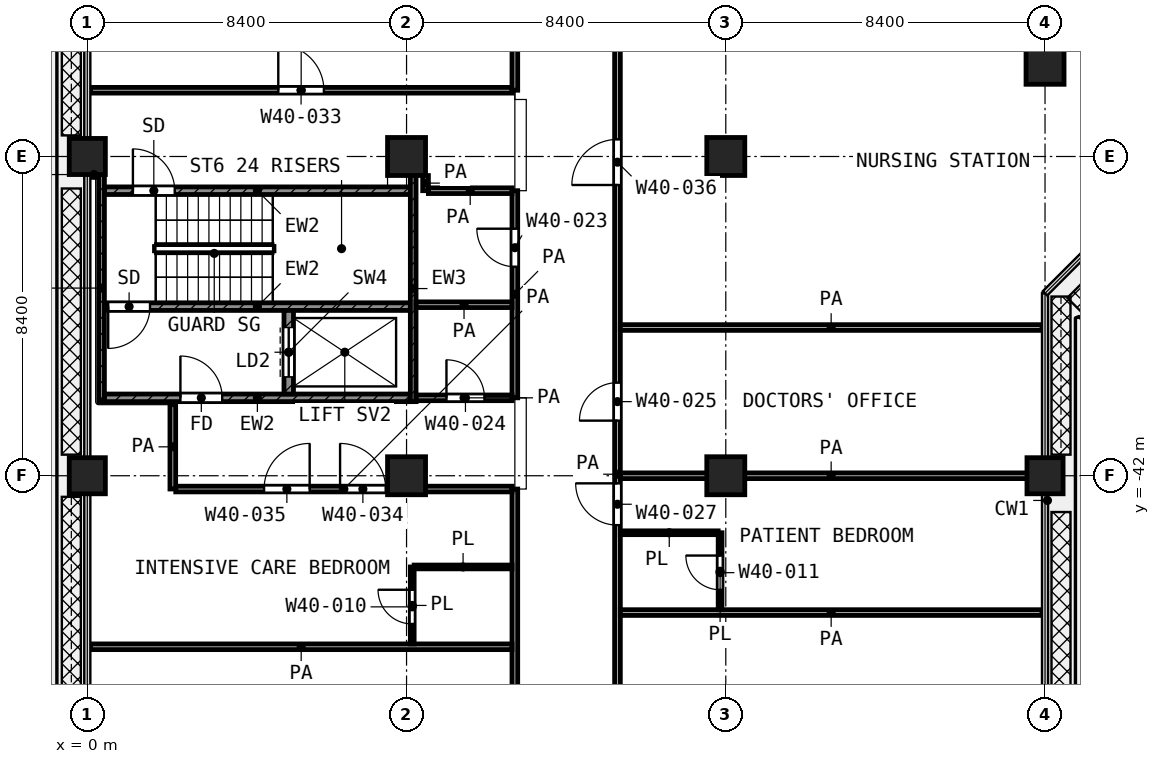
"""IFC4 building model, lengths in metres.
Left out: names, types, materials, properties, quantities, classifications, styles, units other than length and angle.
Written with IfcOpenShell. Run it as: python <this file> out.ifc"""

import sys

from ifc_helpers import new_model, si_unit, direction, frame, frame_2d, origin, origin_2d, place, context, subcontext, project, spatial, rectangle, extrude, element, fill, save


model = new_model("IFC4")
c1 = context("Model", 3, precision=1e-05, world=origin(), true_north=direction((0.0, 1.0)))
c2 = subcontext(c1, "Body", "Model", "MODEL_VIEW")
j1 = project(units=[si_unit("LENGTHUNIT", "METRE"), si_unit("PLANEANGLEUNIT", "RADIAN")], contexts=[c1])
p1 = place(None, origin())
s1 = spatial("IfcSite", under=j1, at=p1, CompositionType="ELEMENT")
p2 = place(p1, origin())
s2 = spatial("IfcBuilding", under=s1, at=p2, CompositionType="ELEMENT")
p3 = place(p2, frame((0.0, 0.0, 196.2)))
s3 = spatial("IfcBuildingStorey", under=s2, at=p3, CompositionType="ELEMENT", Elevation=196.2)
p4 = place(p3, frame((25.2, -31.2, 0.0), z_axis=(0.0, 0.0, 1.0), x_axis=(1.0, 0.0, 0.0)))
e1 = element("IfcColumn", 1, at=p4, inside=s3, PredefinedType="COLUMN", context=c2, shape_type="SweptSolid", body=[
    extrude(rectangle(XDim=1.0, YDim=1.0, at=origin_2d()), origin(), (0.0, 0.0, 1.0), 4.2),
])
p5 = place(p3, frame((0.0, -33.6, 0.0), z_axis=(0.0, 0.0, 1.0), x_axis=(1.0, 0.0, 0.0)))
e2 = element("IfcColumn", 2, at=p5, inside=s3, PredefinedType="COLUMN", context=c2, shape_type="SweptSolid", body=[
    extrude(rectangle(XDim=0.95, YDim=0.95, at=origin_2d()), origin(), (0.0, 0.0, 1.0), 4.2),
])
for number, where, z_axis, x_axis in (
    (3, (8.4, -33.6, 0.0), (0.0, 0.0, 1.0), (1.0, 0.0, 0.0)),
    (4, (16.8, -33.6, 0.0), (0.0, 0.0, 1.0), (1.0, 0.0, 0.0)),
):
    element("IfcColumn", number, at=place(p3, frame(where, z_axis=z_axis, x_axis=x_axis)), inside=s3, PredefinedType="COLUMN", context=c2, shape_type="SweptSolid", body=[
        extrude(rectangle(XDim=1.0, YDim=1.0, at=origin_2d()), origin(), (0.0, 0.0, 1.0), 4.2),
    ])
p6 = place(p3, frame((0.0, -42.0, 0.0), z_axis=(0.0, 0.0, 1.0), x_axis=(1.0, 0.0, 0.0)))
e5 = element("IfcColumn", 5, at=p6, inside=s3, PredefinedType="COLUMN", context=c2, shape_type="SweptSolid", body=[
    extrude(rectangle(XDim=0.95, YDim=0.95, at=origin_2d()), origin(), (0.0, 0.0, 1.0), 4.2),
])
for number, where, z_axis, x_axis in (
    (6, (8.4, -42.0, 0.0), (0.0, 0.0, 1.0), (1.0, 0.0, 0.0)),
    (7, (16.8, -42.0, 0.0), (0.0, 0.0, 1.0), (1.0, 0.0, 0.0)),
):
    element("IfcColumn", number, at=place(p3, frame(where, z_axis=z_axis, x_axis=x_axis)), inside=s3, PredefinedType="COLUMN", context=c2, shape_type="SweptSolid", body=[
        extrude(rectangle(XDim=1.0, YDim=1.0, at=origin_2d()), origin(), (0.0, 0.0, 1.0), 4.2),
    ])
p7 = place(p3, frame((25.2, -42.0, 0.0), z_axis=(0.0, 0.0, 1.0), x_axis=(1.0, 0.0, 0.0)))
e8 = element("IfcColumn", 8, at=p7, inside=s3, PredefinedType="COLUMN", context=c2, shape_type="SweptSolid", body=[
    extrude(rectangle(XDim=0.95, YDim=0.95, at=origin_2d()), origin(), (0.0, 0.0, 1.0), 4.2),
])
p8 = place(p3, frame((0.375, -40.05, 0.0), z_axis=(0.0, 0.0, 1.0), x_axis=(0.0, 1.0, 0.0)))
e9 = element("IfcWall", 9, at=p8, inside=s3, PredefinedType="SHEAR", context=c2, shape_type="SweptSolid", body=[
    extrude(rectangle(XDim=5.975, YDim=0.15, at=frame_2d((2.988, 0.0))), origin(), (0.0, 0.0, 1.0), 3.6),
])
p9 = place(p3, frame((8.575, -40.05, 0.0), z_axis=(0.0, 0.0, 1.0), x_axis=(0.0, 1.0, 0.0)))
e10 = element("IfcWall", 10, at=p9, inside=s3, PredefinedType="SHEAR", context=c2, shape_type="SweptSolid", body=[
    extrude(rectangle(XDim=5.95, YDim=0.15, at=frame_2d((2.975, 0.0))), origin(), (0.0, 0.0, 1.0), 3.6),
])
p10 = place(p3, frame((0.45, -34.5, 0.0), z_axis=(0.0, 0.0, 1.0), x_axis=(1.0, 0.0, 0.0)))
e11 = element("IfcWall", 11, at=p10, inside=s3, PredefinedType="SHEAR", context=c2, shape_type="SweptSolid", body=[
    extrude(rectangle(XDim=8.05, YDim=0.2, at=frame_2d((4.025, 0.0))), origin(), (0.0, 0.0, 1.0), 3.6),
])
p11 = place(p10, frame((0.75, 0.0, 0.0)))
e12 = element("IfcOpeningElement", 12, at=p11, cuts=e11, PredefinedType="OPENING", context=c2, shape_type="SweptSolid", body=[
    extrude(rectangle(XDim=1.1, YDim=2.1, at=frame_2d((0.55, 1.05))), frame((0.0, 0.11, 0.0), z_axis=(0.0, -1.0, 0.0), x_axis=(1.0, 0.0, 0.0)), (0.0, 0.0, 1.0), 0.22),
])
p12 = place(p3, frame((0.45, -37.55, 0.0), z_axis=(0.0, 0.0, 1.0), x_axis=(1.0, 0.0, 0.0)))
e13 = element("IfcWall", 13, at=p12, inside=s3, PredefinedType="SHEAR", context=c2, shape_type="SweptSolid", body=[
    extrude(rectangle(XDim=8.05, YDim=0.2, at=frame_2d((4.025, 0.0))), origin(), (0.0, 0.0, 1.0), 3.6),
])
p13 = place(p12, frame((0.1, 0.0, 0.0)))
e14 = element("IfcOpeningElement", 14, at=p13, cuts=e13, PredefinedType="OPENING", context=c2, shape_type="SweptSolid", body=[
    extrude(rectangle(XDim=1.1, YDim=2.1, at=frame_2d((0.55, 1.05))), frame((0.0, 0.11, 0.0), z_axis=(0.0, -1.0, 0.0), x_axis=(1.0, 0.0, 0.0)), (0.0, 0.0, 1.0), 0.22),
])
p14 = place(p3, frame((0.45, -39.95, 0.0), z_axis=(0.0, 0.0, 1.0), x_axis=(1.0, 0.0, 0.0)))
e15 = element("IfcWall", 15, at=p14, inside=s3, PredefinedType="SHEAR", context=c2, shape_type="SweptSolid", body=[
    extrude(rectangle(XDim=8.05, YDim=0.2, at=frame_2d((4.025, 0.0))), origin(), (0.0, 0.0, 1.0), 3.6),
])
p15 = place(p14, frame((2.0, 0.0, 0.0)))
e16 = element("IfcOpeningElement", 16, at=p15, cuts=e15, PredefinedType="OPENING", context=c2, shape_type="SweptSolid", body=[
    extrude(rectangle(XDim=1.1, YDim=2.1, at=frame_2d((0.55, 1.05))), frame((0.0, 0.11, 0.0), z_axis=(0.0, -1.0, 0.0), x_axis=(1.0, 0.0, 0.0)), (0.0, 0.0, 1.0), 0.22),
])
p16 = place(p3, frame((5.3, -39.85, 0.0), z_axis=(0.0, 0.0, 1.0), x_axis=(0.0, 1.0, 0.0)))
e17 = element("IfcWall", 17, at=p16, inside=s3, PredefinedType="SHEAR", context=c2, shape_type="SweptSolid", body=[
    extrude(rectangle(XDim=2.2, YDim=0.25, at=frame_2d((1.1, 0.0))), origin(), (0.0, 0.0, 1.0), 3.6),
])
p17 = place(p16, frame((0.45, 0.0, 0.0)))
e18 = element("IfcOpeningElement", 18, at=p17, cuts=e17, PredefinedType="OPENING", context=c2, shape_type="SweptSolid", body=[
    extrude(rectangle(XDim=1.3, YDim=2.1, at=frame_2d((0.65, 1.05))), frame((0.0, 0.135, 0.0), z_axis=(0.0, -1.0, 0.0), x_axis=(1.0, 0.0, 0.0)), (0.0, 0.0, 1.0), 0.27),
])
p18 = place(p3, frame((8.6, -44.4, 0.0), z_axis=(0.0, 0.0, 1.0), x_axis=(1.0, 0.0, 0.0)))
e19 = element("IfcWall", 19, at=p18, inside=s3, PredefinedType="PARTITIONING", context=c2, shape_type="SweptSolid", body=[
    extrude(rectangle(XDim=2.575, YDim=0.1, at=frame_2d((1.288, 0.0))), origin(), (0.0, 0.0, 1.0), 3.6),
])
p19 = place(p3, frame((14.025, -43.5, 0.0), z_axis=(0.0, 0.0, 1.0), x_axis=(1.0, 0.0, 0.0)))
e20 = element("IfcWall", 20, at=p19, inside=s3, PredefinedType="PARTITIONING", context=c2, shape_type="SweptSolid", body=[
    extrude(rectangle(XDim=2.575, YDim=0.1, at=frame_2d((1.288, 0.0))), origin(), (0.0, 0.0, 1.0), 3.6),
])
p20 = place(p3, frame((8.55, -46.425, 0.0), z_axis=(0.0, 0.0, 1.0), x_axis=(0.0, 1.0, 0.0)))
e21 = element("IfcWall", 21, at=p20, inside=s3, PredefinedType="PARTITIONING", context=c2, shape_type="SweptSolid", body=[
    extrude(rectangle(XDim=2.025, YDim=0.1, at=frame_2d((1.013, 0.0))), origin(), (0.0, 0.0, 1.0), 3.6),
])
p21 = place(p20, frame((0.525, 0.0, 0.0)))
e22 = element("IfcOpeningElement", 22, at=p21, cuts=e21, PredefinedType="OPENING", context=c2, shape_type="SweptSolid", body=[
    extrude(rectangle(XDim=0.9, YDim=2.1, at=frame_2d((0.45, 1.05))), frame((0.0, 0.06, 0.0), z_axis=(0.0, -1.0, 0.0), x_axis=(1.0, 0.0, 0.0)), (0.0, 0.0, 1.0), 0.12),
])
p22 = place(p3, frame((16.65, -45.525, 0.0), z_axis=(0.0, 0.0, 1.0), x_axis=(0.0, 1.0, 0.0)))
e23 = element("IfcWall", 23, at=p22, inside=s3, PredefinedType="PARTITIONING", context=c2, shape_type="SweptSolid", body=[
    extrude(rectangle(XDim=2.025, YDim=0.1, at=frame_2d((1.012, 0.0))), origin(), (0.0, 0.0, 1.0), 3.6),
])
p23 = place(p22, frame((0.525, 0.0, 0.0)))
e24 = element("IfcOpeningElement", 24, at=p23, cuts=e23, PredefinedType="OPENING", context=c2, shape_type="SweptSolid", body=[
    extrude(rectangle(XDim=0.9, YDim=2.1, at=frame_2d((0.45, 1.05))), frame((0.0, 0.06, 0.0), z_axis=(0.0, -1.0, 0.0), x_axis=(1.0, 0.0, 0.0)), (0.0, 0.0, 1.0), 0.12),
])
p24 = place(p3, frame((0.08, -46.5, 0.0), z_axis=(0.0, 0.0, 1.0), x_axis=(1.0, 0.0, 0.0)))
e25 = element("IfcWall", 25, at=p24, inside=s3, PredefinedType="PARTITIONING", context=c2, shape_type="SweptSolid", body=[
    extrude(rectangle(XDim=11.095, YDim=0.15, at=frame_2d((5.547, 0.0))), origin(), (0.0, 0.0, 1.0), 3.6),
])
p25 = place(p3, frame((14.025, -45.6, 0.0), z_axis=(0.0, 0.0, 1.0), x_axis=(1.0, 0.0, 0.0)))
e26 = element("IfcWall", 26, at=p25, inside=s3, PredefinedType="PARTITIONING", context=c2, shape_type="SweptSolid", body=[
    extrude(rectangle(XDim=11.095, YDim=0.15, at=frame_2d((5.548, 0.0))), origin(), (0.0, 0.0, 1.0), 3.6),
])
p26 = place(p3, frame((2.327, -42.35, 0.0), z_axis=(0.0, 0.0, 1.0), x_axis=(1.0, 0.0, 0.0)))
e27 = element("IfcWall", 27, at=p26, inside=s3, PredefinedType="PARTITIONING", context=c2, shape_type="SweptSolid", body=[
    extrude(rectangle(XDim=8.848, YDim=0.15, at=frame_2d((4.424, 0.0))), origin(), (0.0, 0.0, 1.0), 3.6),
])
p27 = place(p26, frame((4.324, 0.0, 0.0)))
e28 = element("IfcOpeningElement", 28, at=p27, cuts=e27, PredefinedType="OPENING", context=c2, shape_type="SweptSolid", body=[
    extrude(rectangle(XDim=1.2, YDim=2.1, at=frame_2d((0.6, 1.05))), frame((0.0, 0.085, 0.0), z_axis=(0.0, -1.0, 0.0), x_axis=(1.0, 0.0, 0.0)), (0.0, 0.0, 1.0), 0.17),
])
p28 = place(p26, frame((2.324, 0.0, 0.0)))
e29 = element("IfcOpeningElement", 29, at=p28, cuts=e27, PredefinedType="OPENING", context=c2, shape_type="SweptSolid", body=[
    extrude(rectangle(XDim=1.2, YDim=2.1, at=frame_2d((0.6, 1.05))), frame((0.0, 0.085, 0.0), z_axis=(0.0, -1.0, 0.0), x_axis=(1.0, 0.0, 0.0)), (0.0, 0.0, 1.0), 0.17),
])
p29 = place(p3, frame((14.025, -42.0, 0.0), z_axis=(0.0, 0.0, 1.0), x_axis=(1.0, 0.0, 0.0)))
e30 = element("IfcWall", 30, at=p29, inside=s3, PredefinedType="PARTITIONING", context=c2, shape_type="SweptSolid", body=[
    extrude(rectangle(XDim=11.095, YDim=0.15, at=frame_2d((5.548, 0.0))), origin(), (0.0, 0.0, 1.0), 3.6),
])
p30 = place(p3, frame((8.65, -39.95, 0.0), z_axis=(0.0, 0.0, 1.0), x_axis=(1.0, 0.0, 0.0)))
e31 = element("IfcWall", 31, at=p30, inside=s3, PredefinedType="PARTITIONING", context=c2, shape_type="SweptSolid", body=[
    extrude(rectangle(XDim=2.525, YDim=0.15, at=frame_2d((1.263, 0.0))), origin(), (0.0, 0.0, 1.0), 3.6),
])
p31 = place(p30, frame((0.8, 0.0, 0.0)))
e32 = element("IfcOpeningElement", 32, at=p31, cuts=e31, PredefinedType="OPENING", context=c2, shape_type="SweptSolid", body=[
    extrude(rectangle(XDim=1.0, YDim=2.1, at=frame_2d((0.5, 1.05))), frame((0.0, 0.085, 0.0), z_axis=(0.0, -1.0, 0.0), x_axis=(1.0, 0.0, 0.0)), (0.0, 0.0, 1.0), 0.17),
])
p32 = place(p3, frame((14.025, -38.1, 0.0), z_axis=(0.0, 0.0, 1.0), x_axis=(1.0, 0.0, 0.0)))
e33 = element("IfcWall", 33, at=p32, inside=s3, PredefinedType="PARTITIONING", context=c2, shape_type="SweptSolid", body=[
    extrude(rectangle(XDim=11.095, YDim=0.15, at=frame_2d((5.548, 0.0))), origin(), (0.0, 0.0, 1.0), 3.6),
])
p33 = place(p3, frame((8.65, -37.5, 0.0), z_axis=(0.0, 0.0, 1.0), x_axis=(1.0, 0.0, 0.0)))
e34 = element("IfcWall", 34, at=p33, inside=s3, PredefinedType="PARTITIONING", context=c2, shape_type="SweptSolid", body=[
    extrude(rectangle(XDim=2.525, YDim=0.15, at=frame_2d((1.263, 0.0))), origin(), (0.0, 0.0, 1.0), 3.6),
])
p34 = place(p3, frame((8.975, -34.5, 0.0), z_axis=(0.0, 0.0, 1.0), x_axis=(1.0, 0.0, 0.0)))
e35 = element("IfcWall", 35, at=p34, inside=s3, PredefinedType="PARTITIONING", context=c2, shape_type="SweptSolid", body=[
    extrude(rectangle(XDim=2.2, YDim=0.15, at=frame_2d((1.1, 0.0))), origin(), (0.0, 0.0, 1.0), 3.6),
])
p35 = place(p3, frame((0.08, -34.075, 0.0), z_axis=(0.0, 0.0, 1.0), x_axis=(1.0, 0.0, 0.0)))
e36 = element("IfcWall", 36, at=p35, inside=s3, PredefinedType="PARTITIONING", context=c2, shape_type="SweptSolid", body=[
    extrude(rectangle(XDim=0.19, YDim=0.15, at=frame_2d((0.095, 0.0))), origin(), (0.0, 0.0, 1.0), 3.6),
])
p36 = place(p3, frame((0.08, -31.857, 0.0), z_axis=(0.0, 0.0, 1.0), x_axis=(1.0, 0.0, 0.0)))
e37 = element("IfcWall", 37, at=p36, inside=s3, PredefinedType="PARTITIONING", context=c2, shape_type="SweptSolid", body=[
    extrude(rectangle(XDim=11.095, YDim=0.15, at=frame_2d((5.547, 0.0))), origin(), (0.0, 0.0, 1.0), 3.6),
])
p37 = place(p36, frame((4.945, 0.0, 0.0)))
e38 = element("IfcOpeningElement", 38, at=p37, cuts=e37, PredefinedType="OPENING", context=c2, shape_type="SweptSolid", body=[
    extrude(rectangle(XDim=1.2, YDim=2.1, at=frame_2d((0.6, 1.05))), frame((0.0, 0.085, 0.0), z_axis=(0.0, -1.0, 0.0), x_axis=(1.0, 0.0, 0.0)), (0.0, 0.0, 1.0), 0.17),
])
p38 = place(p3, frame((2.25, -42.349, 0.0), z_axis=(0.0, 0.0, 1.0), x_axis=(0.0, 1.0, 0.0)))
e39 = element("IfcWall", 39, at=p38, inside=s3, PredefinedType="PARTITIONING", context=c2, shape_type="SweptSolid", body=[
    extrude(rectangle(XDim=2.219, YDim=0.15, at=frame_2d((1.11, 0.0))), origin(), (0.0, 0.0, 1.0), 3.6),
])
p39 = place(p3, frame((8.9, -34.5, 0.0), z_axis=(0.0, 0.0, 1.0), x_axis=(0.0, 1.0, 0.0)))
e40 = element("IfcWall", 40, at=p39, inside=s3, PredefinedType="PARTITIONING", context=c2, shape_type="SweptSolid", body=[
    extrude(rectangle(XDim=0.399, YDim=0.15, at=frame_2d((0.199, 0.0))), origin(), (0.0, 0.0, 1.0), 3.6),
])
p40 = place(p3, frame((11.25, -54.52, 0.0), z_axis=(0.0, 0.0, 1.0), x_axis=(0.0, 1.0, 0.0)))
e41 = element("IfcWall", 41, at=p40, inside=s3, PredefinedType="PARTITIONING", context=c2, shape_type="SweptSolid", body=[
    extrude(rectangle(XDim=12.17, YDim=0.15, at=frame_2d((6.085, 0.0))), origin(), (0.0, 0.0, 1.0), 3.6),
])
p41 = place(p40, frame((3.22, 0.0, 0.0)))
e42 = element("IfcOpeningElement", 42, at=p41, cuts=e41, PredefinedType="OPENING", context=c2, shape_type="SweptSolid", body=[
    extrude(rectangle(XDim=1.5, YDim=2.1, at=frame_2d((0.75, 1.05))), frame((0.0, 0.085, 0.0), z_axis=(0.0, -1.0, 0.0), x_axis=(1.0, 0.0, 0.0)), (0.0, 0.0, 1.0), 0.17),
])
p42 = place(p3, frame((11.25, -39.95, 0.0), z_axis=(0.0, 0.0, 1.0), x_axis=(0.0, 1.0, 0.0)))
e43 = element("IfcWall", 43, at=p42, inside=s3, PredefinedType="PARTITIONING", context=c2, shape_type="SweptSolid", body=[
    extrude(rectangle(XDim=5.45, YDim=0.15, at=frame_2d((2.725, 0.0))), origin(), (0.0, 0.0, 1.0), 3.6),
])
p43 = place(p42, frame((3.45, 0.0, 0.0)))
e44 = element("IfcOpeningElement", 44, at=p43, cuts=e43, PredefinedType="OPENING", context=c2, shape_type="SweptSolid", body=[
    extrude(rectangle(XDim=1.0, YDim=2.1, at=frame_2d((0.5, 1.05))), frame((0.0, 0.085, 0.0), z_axis=(0.0, -1.0, 0.0), x_axis=(1.0, 0.0, 0.0)), (0.0, 0.0, 1.0), 0.17),
])
p44 = place(p3, frame((11.25, -31.857, 0.0), z_axis=(0.0, 0.0, 1.0), x_axis=(0.0, 1.0, 0.0)))
e45 = element("IfcWall", 45, at=p44, inside=s3, PredefinedType="PARTITIONING", context=c2, shape_type="SweptSolid", body=[
    extrude(rectangle(XDim=2.457, YDim=0.15, at=frame_2d((1.229, 0.0))), origin(), (0.0, 0.0, 1.0), 3.6),
])
p45 = place(p3, frame((13.95, -54.52, 0.0), z_axis=(0.0, 0.0, 1.0), x_axis=(0.0, 1.0, 0.0)))
e46 = element("IfcWall", 46, at=p45, inside=s3, PredefinedType="PARTITIONING", context=c2, shape_type="SweptSolid", body=[
    extrude(rectangle(XDim=25.12, YDim=0.15, at=frame_2d((12.56, 0.0))), origin(), (0.0, 0.0, 1.0), 3.6),
])
p46 = place(p45, frame((20.17, 0.0, 0.0)))
e47 = element("IfcOpeningElement", 47, at=p46, cuts=e46, PredefinedType="OPENING", context=c2, shape_type="SweptSolid", body=[
    extrude(rectangle(XDim=1.2, YDim=2.1, at=frame_2d((0.6, 1.05))), frame((0.0, 0.085, 0.0), z_axis=(0.0, -1.0, 0.0), x_axis=(1.0, 0.0, 0.0)), (0.0, 0.0, 1.0), 0.17),
])
p47 = place(p45, frame((13.97, 0.0, 0.0)))
e48 = element("IfcOpeningElement", 48, at=p47, cuts=e46, PredefinedType="OPENING", context=c2, shape_type="SweptSolid", body=[
    extrude(rectangle(XDim=1.0, YDim=2.1, at=frame_2d((0.5, 1.05))), frame((0.0, 0.085, 0.0), z_axis=(0.0, -1.0, 0.0), x_axis=(1.0, 0.0, 0.0)), (0.0, 0.0, 1.0), 0.17),
])
p48 = place(p45, frame((11.22, 0.0, 0.0)))
e49 = element("IfcOpeningElement", 49, at=p48, cuts=e46, PredefinedType="OPENING", context=c2, shape_type="SweptSolid", body=[
    extrude(rectangle(XDim=1.1, YDim=2.1, at=frame_2d((0.55, 1.05))), frame((0.0, 0.085, 0.0), z_axis=(0.0, -1.0, 0.0), x_axis=(1.0, 0.0, 0.0)), (0.0, 0.0, 1.0), 0.17),
])
p49 = place(p45, frame((3.67, 0.0, 0.0)))
e50 = element("IfcOpeningElement", 50, at=p49, cuts=e46, PredefinedType="OPENING", context=c2, shape_type="SweptSolid", body=[
    extrude(rectangle(XDim=1.5, YDim=2.1, at=frame_2d((0.75, 1.05))), frame((0.0, 0.085, 0.0), z_axis=(0.0, -1.0, 0.0), x_axis=(1.0, 0.0, 0.0)), (0.0, 0.0, 1.0), 0.17),
])
p50 = place(p11, origin())
e51 = element("IfcDoor", 51, at=p50, inside=s3, OperationType="SINGLE_SWING_LEFT", PredefinedType="DOOR", context=c2, shape_type="SweptSolid", body=[
    extrude(rectangle(XDim=1.1, YDim=2.1, at=frame_2d((0.55, 1.05))), frame((0.0, 0.025, 0.0), z_axis=(0.0, -1.0, 0.0), x_axis=(1.0, 0.0, 0.0)), (0.0, 0.0, 1.0), 0.05),
])
fill(e12, e51)
p51 = place(p13, frame((1.1, 0.0, 0.0), z_axis=(0.0, 0.0, 1.0), x_axis=(-1.0, 0.0, 0.0)))
e52 = element("IfcDoor", 52, at=p51, inside=s3, OperationType="SINGLE_SWING_LEFT", PredefinedType="DOOR", context=c2, shape_type="SweptSolid", body=[
    extrude(rectangle(XDim=1.1, YDim=2.1, at=frame_2d((0.55, 1.05))), frame((0.0, 0.025, 0.0), z_axis=(0.0, -1.0, 0.0), x_axis=(1.0, 0.0, 0.0)), (0.0, 0.0, 1.0), 0.05),
])
fill(e14, e52)
p52 = place(p17, origin())
e53 = element("IfcDoor", 53, at=p52, inside=s3, OperationType="DOUBLE_DOOR_SLIDING", PredefinedType="DOOR", context=c2, shape_type="SweptSolid", body=[
    extrude(rectangle(XDim=1.3, YDim=2.1, at=frame_2d((0.65, 1.05))), frame((0.0, 0.025, 0.0), z_axis=(0.0, -1.0, 0.0), x_axis=(1.0, 0.0, 0.0)), (0.0, 0.0, 1.0), 0.05),
])
fill(e18, e53)
p53 = place(p15, origin())
e54 = element("IfcDoor", 54, at=p53, inside=s3, OperationType="SINGLE_SWING_LEFT", PredefinedType="DOOR", context=c2, shape_type="SweptSolid", body=[
    extrude(rectangle(XDim=1.1, YDim=2.1, at=frame_2d((0.55, 1.05))), frame((0.0, 0.025, 0.0), z_axis=(0.0, -1.0, 0.0), x_axis=(1.0, 0.0, 0.0)), (0.0, 0.0, 1.0), 0.05),
])
fill(e16, e54)
p54 = place(p37, origin())
e55 = element("IfcDoor", 55, at=p54, inside=s3, OperationType="SINGLE_SWING_LEFT", PredefinedType="DOOR", context=c2, shape_type="SweptSolid", body=[
    extrude(rectangle(XDim=1.2, YDim=2.1, at=frame_2d((0.6, 1.05))), frame((0.0, 0.025, 0.0), z_axis=(0.0, -1.0, 0.0), x_axis=(1.0, 0.0, 0.0)), (0.0, 0.0, 1.0), 0.05),
])
fill(e38, e55)
p55 = place(p43, origin())
e56 = element("IfcDoor", 56, at=p55, inside=s3, OperationType="SINGLE_SWING_RIGHT", PredefinedType="DOOR", context=c2, shape_type="SweptSolid", body=[
    extrude(rectangle(XDim=1.0, YDim=2.1, at=frame_2d((0.5, 1.05))), frame((0.0, 0.025, 0.0), z_axis=(0.0, -1.0, 0.0), x_axis=(1.0, 0.0, 0.0)), (0.0, 0.0, 1.0), 0.05),
])
fill(e44, e56)
p56 = place(p31, origin())
e57 = element("IfcDoor", 57, at=p56, inside=s3, OperationType="SINGLE_SWING_LEFT", PredefinedType="DOOR", context=c2, shape_type="SweptSolid", body=[
    extrude(rectangle(XDim=1.0, YDim=2.1, at=frame_2d((0.5, 1.05))), frame((0.0, 0.025, 0.0), z_axis=(0.0, -1.0, 0.0), x_axis=(1.0, 0.0, 0.0)), (0.0, 0.0, 1.0), 0.05),
])
fill(e32, e57)
p57 = place(p27, origin())
e58 = element("IfcDoor", 58, at=p57, inside=s3, OperationType="SINGLE_SWING_LEFT", PredefinedType="DOOR", context=c2, shape_type="SweptSolid", body=[
    extrude(rectangle(XDim=1.2, YDim=2.1, at=frame_2d((0.6, 1.05))), frame((0.0, 0.025, 0.0), z_axis=(0.0, -1.0, 0.0), x_axis=(1.0, 0.0, 0.0)), (0.0, 0.0, 1.0), 0.05),
])
fill(e28, e58)
p58 = place(p28, origin())
e59 = element("IfcDoor", 59, at=p58, inside=s3, OperationType="SINGLE_SWING_RIGHT", PredefinedType="DOOR", context=c2, shape_type="SweptSolid", body=[
    extrude(rectangle(XDim=1.2, YDim=2.1, at=frame_2d((0.6, 1.05))), frame((0.0, 0.025, 0.0), z_axis=(0.0, -1.0, 0.0), x_axis=(1.0, 0.0, 0.0)), (0.0, 0.0, 1.0), 0.05),
])
fill(e29, e59)
p59 = place(p21, origin())
e60 = element("IfcDoor", 60, at=p59, inside=s3, OperationType="SINGLE_SWING_RIGHT", PredefinedType="DOOR", context=c2, shape_type="SweptSolid", body=[
    extrude(rectangle(XDim=0.9, YDim=2.1, at=frame_2d((0.45, 1.05))), frame((0.0, 0.025, 0.0), z_axis=(0.0, -1.0, 0.0), x_axis=(1.0, 0.0, 0.0)), (0.0, 0.0, 1.0), 0.05),
])
fill(e22, e60)
p60 = place(p46, origin())
e61 = element("IfcDoor", 61, at=p60, inside=s3, OperationType="SINGLE_SWING_LEFT", PredefinedType="DOOR", context=c2, shape_type="SweptSolid", body=[
    extrude(rectangle(XDim=1.2, YDim=2.1, at=frame_2d((0.6, 1.05))), frame((0.0, 0.025, 0.0), z_axis=(0.0, -1.0, 0.0), x_axis=(1.0, 0.0, 0.0)), (0.0, 0.0, 1.0), 0.05),
])
fill(e47, e61)
p61 = place(p47, origin())
e62 = element("IfcDoor", 62, at=p61, inside=s3, OperationType="SINGLE_SWING_LEFT", PredefinedType="DOOR", context=c2, shape_type="SweptSolid", body=[
    extrude(rectangle(XDim=1.0, YDim=2.1, at=frame_2d((0.5, 1.05))), frame((0.0, 0.025, 0.0), z_axis=(0.0, -1.0, 0.0), x_axis=(1.0, 0.0, 0.0)), (0.0, 0.0, 1.0), 0.05),
])
fill(e48, e62)
p62 = place(p48, origin())
e63 = element("IfcDoor", 63, at=p62, inside=s3, OperationType="SINGLE_SWING_RIGHT", PredefinedType="DOOR", context=c2, shape_type="SweptSolid", body=[
    extrude(rectangle(XDim=1.1, YDim=2.1, at=frame_2d((0.55, 1.05))), frame((0.0, 0.025, 0.0), z_axis=(0.0, -1.0, 0.0), x_axis=(1.0, 0.0, 0.0)), (0.0, 0.0, 1.0), 0.05),
])
fill(e49, e63)
p63 = place(p23, origin())
e64 = element("IfcDoor", 64, at=p63, inside=s3, OperationType="SINGLE_SWING_RIGHT", PredefinedType="DOOR", context=c2, shape_type="SweptSolid", body=[
    extrude(rectangle(XDim=0.9, YDim=2.1, at=frame_2d((0.45, 1.05))), frame((0.0, 0.025, 0.0), z_axis=(0.0, -1.0, 0.0), x_axis=(1.0, 0.0, 0.0)), (0.0, 0.0, 1.0), 0.05),
])
fill(e24, e64)
save(model, sys.argv[1])
